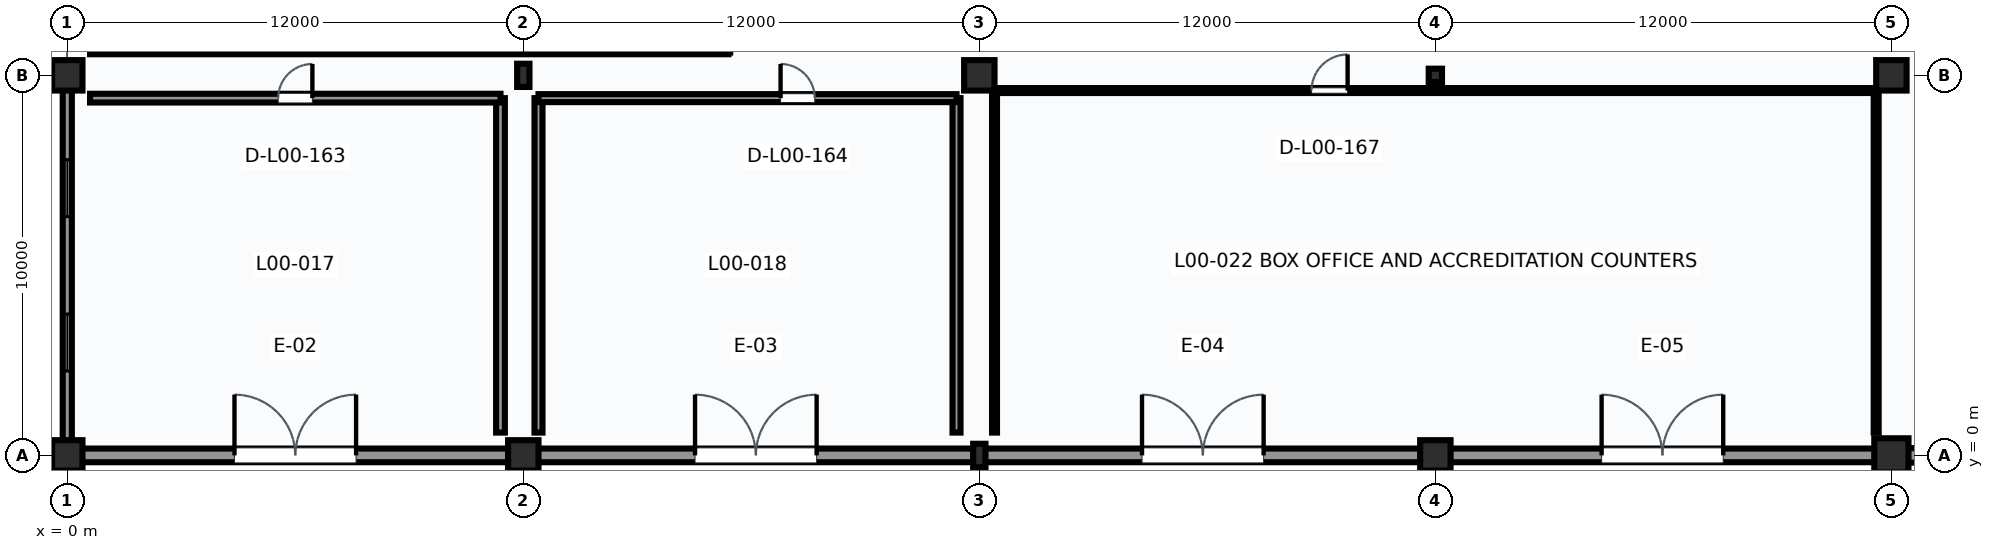
"""IFC4 building model, lengths in metres.
Left out: names, types, materials, properties, quantities, classifications, styles, units other than length and angle.
Written with IfcOpenShell. Run it as: python <this file> out.ifc"""

import sys

from ifc_helpers import new_model, si_unit, direction, frame, frame_2d, origin, origin_2d, place, context, subcontext, project, spatial, rectangle, hollow_rectangle, i_section, extrude, element, fill, save


model = new_model("IFC4")
c1 = context("Model", 3, precision=1e-05, world=origin(), true_north=direction((0.0, 1.0)))
c2 = subcontext(c1, "Body", "Model", "MODEL_VIEW")
j1 = project(units=[si_unit("LENGTHUNIT", "METRE"), si_unit("PLANEANGLEUNIT", "RADIAN")], contexts=[c1])
p1 = place(None, origin())
s1 = spatial("IfcSite", under=j1, at=p1, CompositionType="ELEMENT")
p2 = place(p1, origin())
s2 = spatial("IfcBuilding", under=s1, at=p2, CompositionType="ELEMENT")
p3 = place(p2, origin())
s3 = spatial("IfcBuildingStorey", under=s2, at=p3, CompositionType="ELEMENT", Elevation=0.0)
for number, where, z_axis, x_axis in (
    (1, (0.0, 0.0, 0.0), (0.0, 0.0, 1.0), (1.0, 0.0, 0.0)),
    (2, (0.0, 10.0, 0.0), (0.0, 0.0, 1.0), (1.0, 0.0, 0.0)),
    (3, (12.0, 0.0, 0.0), (0.0, 0.0, 1.0), (1.0, 0.0, 0.0)),
):
    element("IfcColumn", number, at=place(p3, frame(where, z_axis=z_axis, x_axis=x_axis)), inside=s3, PredefinedType="COLUMN", context=c2, shape_type="SweptSolid", body=[
        extrude(rectangle(XDim=0.8, YDim=0.8, at=origin_2d()), origin(), (0.0, 0.0, 1.0), 5.4),
    ])
for number, where, z_axis, x_axis in (
    (4, (12.0, 10.0, 0.0), (0.0, 0.0, 1.0), (1.0, 0.0, 0.0)),
    (5, (24.0, 0.0, 0.0), (0.0, 0.0, 1.0), (1.0, 0.0, 0.0)),
):
    element("IfcColumn", number, at=place(p3, frame(where, z_axis=z_axis, x_axis=x_axis)), inside=s3, PredefinedType="COLUMN", context=c2, shape_type="SweptSolid", body=[
        extrude(i_section(OverallWidth=0.324, OverallDepth=0.611, WebThickness=0.013, FlangeThickness=0.019, FilletRadius=0.016, at=origin_2d()), origin(), (0.0, 0.0, 1.0), 5.4),
    ])
for number, where, z_axis, x_axis in (
    (6, (24.0, 10.0, 0.0), (0.0, 0.0, 1.0), (1.0, 0.0, 0.0)),
    (7, (36.0, 0.0, 0.0), (0.0, 0.0, 1.0), (1.0, 0.0, 0.0)),
):
    element("IfcColumn", number, at=place(p3, frame(where, z_axis=z_axis, x_axis=x_axis)), inside=s3, PredefinedType="COLUMN", context=c2, shape_type="SweptSolid", body=[
        extrude(rectangle(XDim=0.8, YDim=0.8, at=origin_2d()), origin(), (0.0, 0.0, 1.0), 5.4),
    ])
p4 = place(p3, frame((36.0, 10.0, 0.0), z_axis=(0.0, 0.0, 1.0), x_axis=(1.0, 0.0, 0.0)))
e8 = element("IfcColumn", 8, at=p4, inside=s3, PredefinedType="COLUMN", context=c2, shape_type="SweptSolid", body=[
    extrude(hollow_rectangle(XDim=0.35, YDim=0.35, WallThickness=0.016, InnerFilletRadius=0.016, OuterFilletRadius=0.032, at=origin_2d()), origin(), (0.0, 0.0, 1.0), 5.4),
])
p5 = place(p3, frame((48.0, 0.0, 0.0), z_axis=(0.0, 0.0, 1.0), x_axis=(1.0, 0.0, 0.0)))
e9 = element("IfcColumn", 9, at=p5, inside=s3, PredefinedType="COLUMN", context=c2, shape_type="SweptSolid", body=[
    extrude(rectangle(XDim=0.9, YDim=0.9, at=origin_2d()), origin(), (0.0, 0.0, 1.0), 5.4),
])
p6 = place(p3, frame((48.0, 10.0, 0.0), z_axis=(0.0, 0.0, 1.0), x_axis=(1.0, 0.0, 0.0)))
e10 = element("IfcColumn", 10, at=p6, inside=s3, PredefinedType="COLUMN", context=c2, shape_type="SweptSolid", body=[
    extrude(rectangle(XDim=0.8, YDim=0.8, at=origin_2d()), origin(), (0.0, 0.0, 1.0), 5.4),
])
p7 = place(p3, frame((48.435, 0.0, 0.0), z_axis=(0.0, 0.0, 1.0), x_axis=(1.0, 0.0, 0.0)))
e11 = element("IfcWall", 11, at=p7, inside=s3, PredefinedType="SOLIDWALL", context=c2, shape_type="SweptSolid", body=[
    extrude(rectangle(XDim=11.155, YDim=0.38, at=frame_2d((5.578, 0.0))), origin(), (0.0, 0.0, 1.0), 4.5),
])
p8 = place(p7, frame((0.8, 0.0, 0.0)))
e12 = element("IfcOpeningElement", 12, at=p8, cuts=e11, PredefinedType="OPENING", context=c2, shape_type="SweptSolid", body=[
    extrude(rectangle(XDim=2.4, YDim=2.4, at=frame_2d((1.2, 1.2))), frame((0.0, 0.2, 0.0), z_axis=(0.0, -1.0, 0.0), x_axis=(1.0, 0.0, 0.0)), (0.0, 0.0, 1.0), 0.4),
])
p9 = place(p7, frame((4.378, 0.0, 0.0)))
e13 = element("IfcOpeningElement", 13, at=p9, cuts=e11, PredefinedType="OPENING", context=c2, shape_type="SweptSolid", body=[
    extrude(rectangle(XDim=2.4, YDim=2.4, at=frame_2d((1.2, 1.2))), frame((0.0, 0.2, 0.0), z_axis=(0.0, -1.0, 0.0), x_axis=(1.0, 0.0, 0.0)), (0.0, 0.0, 1.0), 0.4),
])
p10 = place(p7, frame((7.955, 0.0, 0.0)))
e14 = element("IfcOpeningElement", 14, at=p10, cuts=e11, PredefinedType="OPENING", context=c2, shape_type="SweptSolid", body=[
    extrude(rectangle(XDim=2.4, YDim=2.4, at=frame_2d((1.2, 1.2))), frame((0.0, 0.2, 0.0), z_axis=(0.0, -1.0, 0.0), x_axis=(1.0, 0.0, 0.0)), (0.0, 0.0, 1.0), 0.4),
])
p11 = place(p3, frame((0.0, 0.385, 0.0), z_axis=(0.0, 0.0, 1.0), x_axis=(0.0, 1.0, 0.0)))
e15 = element("IfcWall", 15, at=p11, inside=s3, PredefinedType="SOLIDWALL", context=c2, shape_type="SweptSolid", body=[
    extrude(rectangle(XDim=9.23, YDim=0.24, at=frame_2d((4.615, 0.0))), origin(), (0.0, 0.0, 1.0), 4.347),
])
p12 = place(p11, frame((1.834, 0.0, 0.9)))
e16 = element("IfcOpeningElement", 16, at=p12, cuts=e15, PredefinedType="OPENING", context=c2, shape_type="SweptSolid", body=[
    extrude(rectangle(XDim=1.5, YDim=1.5, at=frame_2d((0.75, 0.75))), frame((0.0, 0.13, 0.0), z_axis=(0.0, -1.0, 0.0), x_axis=(1.0, 0.0, 0.0)), (0.0, 0.0, 1.0), 0.26),
])
p13 = place(p11, frame((5.896, 0.0, 0.9)))
e17 = element("IfcOpeningElement", 17, at=p13, cuts=e15, PredefinedType="OPENING", context=c2, shape_type="SweptSolid", body=[
    extrude(rectangle(XDim=1.5, YDim=1.8, at=frame_2d((0.75, 0.9))), frame((0.0, 0.13, 0.0), z_axis=(0.0, -1.0, 0.0), x_axis=(1.0, 0.0, 0.0)), (0.0, 0.0, 1.0), 0.26),
])
p14 = place(p3, frame((0.385, 0.0, 0.0), z_axis=(0.0, 0.0, 1.0), x_axis=(1.0, 0.0, 0.0)))
e18 = element("IfcWall", 18, at=p14, inside=s3, PredefinedType="SOLIDWALL", context=c2, shape_type="SweptSolid", body=[
    extrude(rectangle(XDim=11.23, YDim=0.36, at=frame_2d((5.615, 0.0))), origin(), (0.0, 0.0, 1.0), 4.347),
])
p15 = place(p14, frame((4.015, 0.0, 0.0)))
e19 = element("IfcOpeningElement", 19, at=p15, cuts=e18, PredefinedType="OPENING", context=c2, shape_type="SweptSolid", body=[
    extrude(rectangle(XDim=3.2, YDim=2.6, at=frame_2d((1.6, 1.3))), frame((0.0, 0.19, 0.0), z_axis=(0.0, -1.0, 0.0), x_axis=(1.0, 0.0, 0.0)), (0.0, 0.0, 1.0), 0.38),
])
p16 = place(p3, frame((12.385, 0.0, 0.0), z_axis=(0.0, 0.0, 1.0), x_axis=(1.0, 0.0, 0.0)))
e20 = element("IfcWall", 20, at=p16, inside=s3, PredefinedType="SOLIDWALL", context=c2, shape_type="SweptSolid", body=[
    extrude(rectangle(XDim=11.468, YDim=0.36, at=frame_2d((5.734, 0.0))), origin(), (0.0, 0.0, 1.0), 4.429),
])
p17 = place(p16, frame((4.134, 0.0, 0.0)))
e21 = element("IfcOpeningElement", 21, at=p17, cuts=e20, PredefinedType="OPENING", context=c2, shape_type="SweptSolid", body=[
    extrude(rectangle(XDim=3.2, YDim=2.4, at=frame_2d((1.6, 1.2))), frame((0.0, 0.19, 0.0), z_axis=(0.0, -1.0, 0.0), x_axis=(1.0, 0.0, 0.0)), (0.0, 0.0, 1.0), 0.38),
])
p18 = place(p3, frame((24.147, 0.0, 0.0), z_axis=(0.0, 0.0, 1.0), x_axis=(1.0, 0.0, 0.0)))
e22 = element("IfcWall", 22, at=p18, inside=s3, PredefinedType="SOLIDWALL", context=c2, shape_type="SweptSolid", body=[
    extrude(rectangle(XDim=11.468, YDim=0.36, at=frame_2d((5.734, 0.0))), origin(), (0.0, 0.0, 1.0), 4.429),
])
p19 = place(p18, frame((4.134, 0.0, 0.0)))
e23 = element("IfcOpeningElement", 23, at=p19, cuts=e22, PredefinedType="OPENING", context=c2, shape_type="SweptSolid", body=[
    extrude(rectangle(XDim=3.2, YDim=2.6, at=frame_2d((1.6, 1.3))), frame((0.0, 0.19, 0.0), z_axis=(0.0, -1.0, 0.0), x_axis=(1.0, 0.0, 0.0)), (0.0, 0.0, 1.0), 0.38),
])
p20 = place(p3, frame((36.385, 0.0, 0.0), z_axis=(0.0, 0.0, 1.0), x_axis=(1.0, 0.0, 0.0)))
e24 = element("IfcWall", 24, at=p20, inside=s3, PredefinedType="SOLIDWALL", context=c2, shape_type="SweptSolid", body=[
    extrude(rectangle(XDim=11.18, YDim=0.36, at=frame_2d((5.59, 0.0))), origin(), (0.0, 0.0, 1.0), 4.347),
])
p21 = place(p20, frame((3.99, 0.0, 0.0)))
e25 = element("IfcOpeningElement", 25, at=p21, cuts=e24, PredefinedType="OPENING", context=c2, shape_type="SweptSolid", body=[
    extrude(rectangle(XDim=3.2, YDim=2.4, at=frame_2d((1.6, 1.2))), frame((0.0, 0.19, 0.0), z_axis=(0.0, -1.0, 0.0), x_axis=(1.0, 0.0, 0.0)), (0.0, 0.0, 1.0), 0.38),
])
p22 = place(p3, frame((17.4, 10.6, 0.0), z_axis=(0.0, 0.0, 1.0), x_axis=(-1.0, 0.0, 0.0)))
e26 = element("IfcWall", 26, at=p22, inside=s3, PredefinedType="PARTITIONING", context=c2, shape_type="SweptSolid", body=[
    extrude(rectangle(XDim=16.8, YDim=0.09, at=frame_2d((8.4, 0.0))), origin(), (0.0, 0.0, 1.0), 4.429),
])
p23 = place(p3, frame((11.4, 9.4, 0.0), z_axis=(0.0, 0.0, 1.0), x_axis=(0.0, -1.0, 0.0)))
e27 = element("IfcWall", 27, at=p23, inside=s3, PredefinedType="SOLIDWALL", context=c2, shape_type="SweptSolid", body=[
    extrude(rectangle(XDim=8.8, YDim=0.23, at=frame_2d((4.4, 0.0))), origin(), (0.0, 0.0, 1.0), 4.627),
])
p24 = place(p3, frame((0.6, 9.4, 0.0), z_axis=(0.0, 0.0, 1.0), x_axis=(1.0, 0.0, 0.0)))
e28 = element("IfcWall", 28, at=p24, inside=s3, PredefinedType="SOLIDWALL", context=c2, shape_type="SweptSolid", body=[
    extrude(rectangle(XDim=10.8, YDim=0.23, at=frame_2d((5.4, 0.0))), origin(), (0.0, 0.0, 1.0), 5.06),
])
p25 = place(p24, frame((4.95, 0.0, 0.0)))
e29 = element("IfcOpeningElement", 29, at=p25, cuts=e28, PredefinedType="OPENING", context=c2, shape_type="SweptSolid", body=[
    extrude(rectangle(XDim=0.9, YDim=2.1, at=frame_2d((0.45, 1.05))), frame((0.0, 0.125, 0.0), z_axis=(0.0, -1.0, 0.0), x_axis=(1.0, 0.0, 0.0)), (0.0, 0.0, 1.0), 0.25),
])
for number, where, z_axis, x_axis in (
    (30, (23.4, 9.4, 0.0), (0.0, 0.0, 1.0), (0.0, -1.0, 0.0)),
    (31, (12.4, 0.6, 0.0), (0.0, 0.0, 1.0), (0.0, 1.0, 0.0)),
):
    element("IfcWall", number, at=place(p3, frame(where, z_axis=z_axis, x_axis=x_axis)), inside=s3, PredefinedType="SOLIDWALL", context=c2, shape_type="SweptSolid", body=[
        extrude(rectangle(XDim=8.8, YDim=0.21, at=frame_2d((4.4, 0.0))), origin(), (0.0, 0.0, 1.0), 4.491),
    ])
p26 = place(p3, frame((12.4, 9.4, 0.0), z_axis=(0.0, 0.0, 1.0), x_axis=(1.0, 0.0, 0.0)))
e32 = element("IfcWall", 32, at=p26, inside=s3, PredefinedType="SOLIDWALL", context=c2, shape_type="SweptSolid", body=[
    extrude(rectangle(XDim=11.0, YDim=0.21, at=frame_2d((5.5, 0.0))), origin(), (0.0, 0.0, 1.0), 5.06),
])
p27 = place(p26, frame((6.37, 0.0, 0.0)))
e33 = element("IfcOpeningElement", 33, at=p27, cuts=e32, PredefinedType="OPENING", context=c2, shape_type="SweptSolid", body=[
    extrude(rectangle(XDim=0.9, YDim=2.1, at=frame_2d((0.45, 1.05))), frame((0.0, 0.115, 0.0), z_axis=(0.0, -1.0, 0.0), x_axis=(1.0, 0.0, 0.0)), (0.0, 0.0, 1.0), 0.23),
])
p28 = place(p3, frame((47.6, 9.6, 0.0), z_axis=(0.0, 0.0, 1.0), x_axis=(0.0, -1.0, 0.0)))
e34 = element("IfcWall", 34, at=p28, inside=s3, PredefinedType="PARTITIONING", context=c2, shape_type="SweptSolid", body=[
    extrude(rectangle(XDim=9.0, YDim=0.13, at=frame_2d((4.5, 0.0))), origin(), (0.0, 0.0, 1.0), 4.686),
])
p29 = place(p3, frame((24.4, 0.6, 0.0), z_axis=(0.0, 0.0, 1.0), x_axis=(0.0, 1.0, 0.0)))
e35 = element("IfcWall", 35, at=p29, inside=s3, PredefinedType="PARTITIONING", context=c2, shape_type="SweptSolid", body=[
    extrude(rectangle(XDim=9.0, YDim=0.13, at=frame_2d((4.5, 0.0))), origin(), (0.0, 0.0, 1.0), 4.58),
])
p30 = place(p3, frame((24.4, 9.6, 0.0), z_axis=(0.0, 0.0, 1.0), x_axis=(1.0, 0.0, 0.0)))
e36 = element("IfcWall", 36, at=p30, inside=s3, PredefinedType="PARTITIONING", context=c2, shape_type="SweptSolid", body=[
    extrude(rectangle(XDim=23.2, YDim=0.13, at=frame_2d((11.6, 0.0))), origin(), (0.0, 0.0, 1.0), 4.424),
])
p31 = place(p30, frame((8.341, 0.0, 0.0)))
e37 = element("IfcOpeningElement", 37, at=p31, cuts=e36, PredefinedType="OPENING", context=c2, shape_type="SweptSolid", body=[
    extrude(rectangle(XDim=0.95, YDim=2.15, at=frame_2d((0.475, 1.075))), frame((0.0, 0.075, 0.0), z_axis=(0.0, -1.0, 0.0), x_axis=(1.0, 0.0, 0.0)), (0.0, 0.0, 1.0), 0.15),
])
p32 = place(p12, origin())
e38 = element("IfcWindow", 38, at=p32, inside=s3, PartitioningType="SINGLE_PANEL", PredefinedType="WINDOW", context=c2, shape_type="SweptSolid", body=[
    extrude(rectangle(XDim=1.5, YDim=1.5, at=frame_2d((0.75, 0.75))), frame((0.0, 0.03, 0.0), z_axis=(0.0, -1.0, 0.0), x_axis=(1.0, 0.0, 0.0)), (0.0, 0.0, 1.0), 0.06),
])
fill(e16, e38)
p33 = place(p13, origin())
e39 = element("IfcWindow", 39, at=p33, inside=s3, PartitioningType="SINGLE_PANEL", PredefinedType="WINDOW", context=c2, shape_type="SweptSolid", body=[
    extrude(rectangle(XDim=1.5, YDim=1.8, at=frame_2d((0.75, 0.9))), frame((0.0, 0.03, 0.0), z_axis=(0.0, -1.0, 0.0), x_axis=(1.0, 0.0, 0.0)), (0.0, 0.0, 1.0), 0.06),
])
fill(e17, e39)
p34 = place(p15, frame((3.2, 0.0, 0.0), z_axis=(0.0, 0.0, 1.0), x_axis=(-1.0, 0.0, 0.0)))
e40 = element("IfcDoor", 40, at=p34, inside=s3, OperationType="DOUBLE_DOOR_SINGLE_SWING", PredefinedType="DOOR", context=c2, shape_type="SweptSolid", body=[
    extrude(rectangle(XDim=3.2, YDim=2.6, at=frame_2d((1.6, 1.3))), frame((0.0, 0.025, 0.0), z_axis=(0.0, -1.0, 0.0), x_axis=(1.0, 0.0, 0.0)), (0.0, 0.0, 1.0), 0.05),
])
fill(e19, e40)
p35 = place(p17, frame((3.2, 0.0, 0.0), z_axis=(0.0, 0.0, 1.0), x_axis=(-1.0, 0.0, 0.0)))
e41 = element("IfcDoor", 41, at=p35, inside=s3, OperationType="DOUBLE_DOOR_SINGLE_SWING", PredefinedType="DOOR", context=c2, shape_type="SweptSolid", body=[
    extrude(rectangle(XDim=3.2, YDim=2.4, at=frame_2d((1.6, 1.2))), frame((0.0, 0.025, 0.0), z_axis=(0.0, -1.0, 0.0), x_axis=(1.0, 0.0, 0.0)), (0.0, 0.0, 1.0), 0.05),
])
fill(e21, e41)
p36 = place(p19, frame((3.2, 0.0, 0.0), z_axis=(0.0, 0.0, 1.0), x_axis=(-1.0, 0.0, 0.0)))
e42 = element("IfcDoor", 42, at=p36, inside=s3, OperationType="DOUBLE_DOOR_SINGLE_SWING", PredefinedType="DOOR", context=c2, shape_type="SweptSolid", body=[
    extrude(rectangle(XDim=3.2, YDim=2.6, at=frame_2d((1.6, 1.3))), frame((0.0, 0.025, 0.0), z_axis=(0.0, -1.0, 0.0), x_axis=(1.0, 0.0, 0.0)), (0.0, 0.0, 1.0), 0.05),
])
fill(e23, e42)
p37 = place(p21, frame((3.2, 0.0, 0.0), z_axis=(0.0, 0.0, 1.0), x_axis=(-1.0, 0.0, 0.0)))
e43 = element("IfcDoor", 43, at=p37, inside=s3, OperationType="DOUBLE_DOOR_SINGLE_SWING", PredefinedType="DOOR", context=c2, shape_type="SweptSolid", body=[
    extrude(rectangle(XDim=3.2, YDim=2.4, at=frame_2d((1.6, 1.2))), frame((0.0, 0.025, 0.0), z_axis=(0.0, -1.0, 0.0), x_axis=(1.0, 0.0, 0.0)), (0.0, 0.0, 1.0), 0.05),
])
fill(e25, e43)
p38 = place(p25, origin())
e44 = element("IfcDoor", 44, at=p38, inside=s3, OperationType="SINGLE_SWING_RIGHT", PredefinedType="DOOR", context=c2, shape_type="SweptSolid", body=[
    extrude(rectangle(XDim=0.9, YDim=2.1, at=frame_2d((0.45, 1.05))), frame((0.0, 0.025, 0.0), z_axis=(0.0, -1.0, 0.0), x_axis=(1.0, 0.0, 0.0)), (0.0, 0.0, 1.0), 0.05),
])
fill(e29, e44)
p39 = place(p27, origin())
e45 = element("IfcDoor", 45, at=p39, inside=s3, OperationType="SINGLE_SWING_LEFT", PredefinedType="DOOR", context=c2, shape_type="SweptSolid", body=[
    extrude(rectangle(XDim=0.9, YDim=2.1, at=frame_2d((0.45, 1.05))), frame((0.0, 0.025, 0.0), z_axis=(0.0, -1.0, 0.0), x_axis=(1.0, 0.0, 0.0)), (0.0, 0.0, 1.0), 0.05),
])
fill(e33, e45)
p40 = place(p31, origin())
e46 = element("IfcDoor", 46, at=p40, inside=s3, OperationType="SINGLE_SWING_RIGHT", PredefinedType="DOOR", context=c2, shape_type="SweptSolid", body=[
    extrude(rectangle(XDim=0.95, YDim=2.15, at=frame_2d((0.475, 1.075))), frame((0.0, 0.025, 0.0), z_axis=(0.0, -1.0, 0.0), x_axis=(1.0, 0.0, 0.0)), (0.0, 0.0, 1.0), 0.05),
])
fill(e37, e46)
save(model, sys.argv[1])
